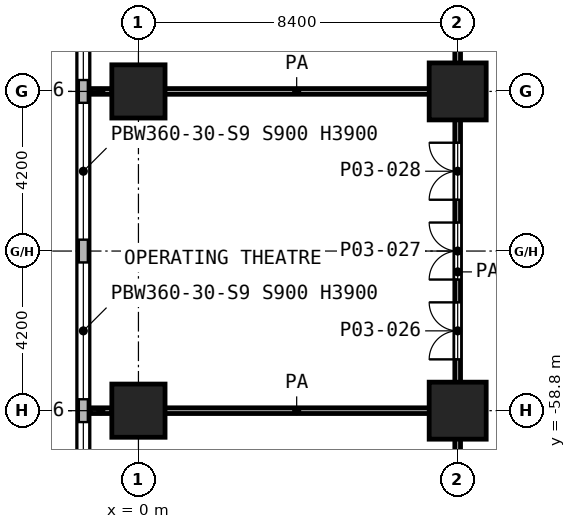
"""IFC4 building model, lengths in metres.
Left out: names, types, materials, properties, quantities, classifications, styles, units other than length and angle.
Written with IfcOpenShell. Run it as: python <this file> out.ifc"""

import sys

from ifc_helpers import new_model, si_unit, direction, frame, frame_2d, origin, origin_2d, place, context, subcontext, project, spatial, rectangle, extrude, element, fill, save


model = new_model("IFC4")
c1 = context("Model", 3, precision=1e-05, world=origin(), true_north=direction((0.0, 1.0)))
c2 = subcontext(c1, "Body", "Model", "MODEL_VIEW")
j1 = project(units=[si_unit("LENGTHUNIT", "METRE"), si_unit("PLANEANGLEUNIT", "RADIAN")], contexts=[c1])
p1 = place(None, origin())
s1 = spatial("IfcSite", under=j1, at=p1, CompositionType="ELEMENT")
p2 = place(p1, origin())
s2 = spatial("IfcBuilding", under=s1, at=p2, CompositionType="ELEMENT")
p3 = place(p2, frame((0.0, 0.0, 12.6)))
s3 = spatial("IfcBuildingStorey", under=s2, at=p3, CompositionType="ELEMENT", Elevation=12.6)
p4 = place(p3, frame((0.0, -50.4, 0.0), z_axis=(0.0, 0.0, 1.0), x_axis=(1.0, 0.0, 0.0)))
e1 = element("IfcColumn", 1, at=p4, inside=s3, PredefinedType="COLUMN", context=c2, shape_type="SweptSolid", body=[
    extrude(rectangle(XDim=1.4, YDim=1.4, at=origin_2d()), origin(), (0.0, 0.0, 1.0), 5.6),
])
p5 = place(p3, frame((8.4, -50.4, 0.0), z_axis=(0.0, 0.0, 1.0), x_axis=(1.0, 0.0, 0.0)))
e2 = element("IfcColumn", 2, at=p5, inside=s3, PredefinedType="COLUMN", context=c2, shape_type="SweptSolid", body=[
    extrude(rectangle(XDim=1.5, YDim=1.5, at=origin_2d()), origin(), (0.0, 0.0, 1.0), 5.6),
])
p6 = place(p3, frame((0.0, -58.8, 0.0), z_axis=(0.0, 0.0, 1.0), x_axis=(1.0, 0.0, 0.0)))
e3 = element("IfcColumn", 3, at=p6, inside=s3, PredefinedType="COLUMN", context=c2, shape_type="SweptSolid", body=[
    extrude(rectangle(XDim=1.4, YDim=1.4, at=origin_2d()), origin(), (0.0, 0.0, 1.0), 5.6),
])
p7 = place(p3, frame((8.4, -58.8, 0.0), z_axis=(0.0, 0.0, 1.0), x_axis=(1.0, 0.0, 0.0)))
e4 = element("IfcColumn", 4, at=p7, inside=s3, PredefinedType="COLUMN", context=c2, shape_type="SweptSolid", body=[
    extrude(rectangle(XDim=1.5, YDim=1.5, at=origin_2d()), origin(), (0.0, 0.0, 1.0), 5.6),
])
p8 = place(p3, frame((-1.45, -4.462, 0.0), z_axis=(0.0, 0.0, 1.0), x_axis=(0.0, -1.0, 0.0)))
e5 = element("IfcWall", 5, at=p8, inside=s3, PredefinedType="SOLIDWALL", context=c2, shape_type="SweptSolid", body=[
    extrude(rectangle(XDim=75.076, YDim=0.3, at=frame_2d((37.538, 0.0))), origin(), (0.0, 0.0, 1.0), 5.25),
])
p9 = place(p8, frame((0.738, 0.0, 0.9)))
e6 = element("IfcOpeningElement", 6, at=p9, cuts=e5, PredefinedType="OPENING", context=c2, shape_type="SweptSolid", body=[
    extrude(rectangle(XDim=2.4, YDim=3.0, at=frame_2d((1.2, 1.5))), frame((0.0, 0.16, 0.0), z_axis=(0.0, -1.0, 0.0), x_axis=(1.0, 0.0, 0.0)), (0.0, 0.0, 1.0), 0.32),
])
p10 = place(p8, frame((4.238, 0.0, 0.9)))
e7 = element("IfcOpeningElement", 7, at=p10, cuts=e5, PredefinedType="OPENING", context=c2, shape_type="SweptSolid", body=[
    extrude(rectangle(XDim=3.6, YDim=3.0, at=frame_2d((1.8, 1.5))), frame((0.0, 0.16, 0.0), z_axis=(0.0, -1.0, 0.0), x_axis=(1.0, 0.0, 0.0)), (0.0, 0.0, 1.0), 0.32),
])
p11 = place(p8, frame((8.438, 0.0, 0.9)))
e8 = element("IfcOpeningElement", 8, at=p11, cuts=e5, PredefinedType="OPENING", context=c2, shape_type="SweptSolid", body=[
    extrude(rectangle(XDim=3.6, YDim=3.0, at=frame_2d((1.8, 1.5))), frame((0.0, 0.16, 0.0), z_axis=(0.0, -1.0, 0.0), x_axis=(1.0, 0.0, 0.0)), (0.0, 0.0, 1.0), 0.32),
])
p12 = place(p8, frame((12.638, 0.0, 0.9)))
e9 = element("IfcOpeningElement", 9, at=p12, cuts=e5, PredefinedType="OPENING", context=c2, shape_type="SweptSolid", body=[
    extrude(rectangle(XDim=3.6, YDim=3.0, at=frame_2d((1.8, 1.5))), frame((0.0, 0.16, 0.0), z_axis=(0.0, -1.0, 0.0), x_axis=(1.0, 0.0, 0.0)), (0.0, 0.0, 1.0), 0.32),
])
p13 = place(p8, frame((16.838, 0.0, 0.9)))
e10 = element("IfcOpeningElement", 10, at=p13, cuts=e5, PredefinedType="OPENING", context=c2, shape_type="SweptSolid", body=[
    extrude(rectangle(XDim=3.6, YDim=3.0, at=frame_2d((1.8, 1.5))), frame((0.0, 0.16, 0.0), z_axis=(0.0, -1.0, 0.0), x_axis=(1.0, 0.0, 0.0)), (0.0, 0.0, 1.0), 0.32),
])
p14 = place(p8, frame((21.403, 0.0, 0.9)))
e11 = element("IfcOpeningElement", 11, at=p14, cuts=e5, PredefinedType="OPENING", context=c2, shape_type="SweptSolid", body=[
    extrude(rectangle(XDim=2.4, YDim=3.0, at=frame_2d((1.2, 1.5))), frame((0.0, 0.16, 0.0), z_axis=(0.0, -1.0, 0.0), x_axis=(1.0, 0.0, 0.0)), (0.0, 0.0, 1.0), 0.32),
])
p15 = place(p8, frame((25.238, 0.0, 0.9)))
e12 = element("IfcOpeningElement", 12, at=p15, cuts=e5, PredefinedType="OPENING", context=c2, shape_type="SweptSolid", body=[
    extrude(rectangle(XDim=3.6, YDim=3.0, at=frame_2d((1.8, 1.5))), frame((0.0, 0.16, 0.0), z_axis=(0.0, -1.0, 0.0), x_axis=(1.0, 0.0, 0.0)), (0.0, 0.0, 1.0), 0.32),
])
p16 = place(p8, frame((30.423, 0.0, 0.9)))
e13 = element("IfcOpeningElement", 13, at=p16, cuts=e5, PredefinedType="OPENING", context=c2, shape_type="SweptSolid", body=[
    extrude(rectangle(XDim=2.4, YDim=3.0, at=frame_2d((1.2, 1.5))), frame((0.0, 0.16, 0.0), z_axis=(0.0, -1.0, 0.0), x_axis=(1.0, 0.0, 0.0)), (0.0, 0.0, 1.0), 0.32),
])
p17 = place(p8, frame((33.638, 0.0, 0.9)))
e14 = element("IfcOpeningElement", 14, at=p17, cuts=e5, PredefinedType="OPENING", context=c2, shape_type="SweptSolid", body=[
    extrude(rectangle(XDim=3.6, YDim=3.0, at=frame_2d((1.8, 1.5))), frame((0.0, 0.16, 0.0), z_axis=(0.0, -1.0, 0.0), x_axis=(1.0, 0.0, 0.0)), (0.0, 0.0, 1.0), 0.32),
])
p18 = place(p8, frame((37.838, 0.0, 0.9)))
e15 = element("IfcOpeningElement", 15, at=p18, cuts=e5, PredefinedType="OPENING", context=c2, shape_type="SweptSolid", body=[
    extrude(rectangle(XDim=3.6, YDim=3.0, at=frame_2d((1.8, 1.5))), frame((0.0, 0.16, 0.0), z_axis=(0.0, -1.0, 0.0), x_axis=(1.0, 0.0, 0.0)), (0.0, 0.0, 1.0), 0.32),
])
p19 = place(p8, frame((42.038, 0.0, 0.9)))
e16 = element("IfcOpeningElement", 16, at=p19, cuts=e5, PredefinedType="OPENING", context=c2, shape_type="SweptSolid", body=[
    extrude(rectangle(XDim=3.6, YDim=3.0, at=frame_2d((1.8, 1.5))), frame((0.0, 0.16, 0.0), z_axis=(0.0, -1.0, 0.0), x_axis=(1.0, 0.0, 0.0)), (0.0, 0.0, 1.0), 0.32),
])
p20 = place(p8, frame((46.238, 0.0, 0.9)))
e17 = element("IfcOpeningElement", 17, at=p20, cuts=e5, PredefinedType="OPENING", context=c2, shape_type="SweptSolid", body=[
    extrude(rectangle(XDim=3.6, YDim=3.0, at=frame_2d((1.8, 1.5))), frame((0.0, 0.16, 0.0), z_axis=(0.0, -1.0, 0.0), x_axis=(1.0, 0.0, 0.0)), (0.0, 0.0, 1.0), 0.32),
])
p21 = place(p8, frame((50.438, 0.0, 0.9)))
e18 = element("IfcOpeningElement", 18, at=p21, cuts=e5, PredefinedType="OPENING", context=c2, shape_type="SweptSolid", body=[
    extrude(rectangle(XDim=3.6, YDim=3.0, at=frame_2d((1.8, 1.5))), frame((0.0, 0.16, 0.0), z_axis=(0.0, -1.0, 0.0), x_axis=(1.0, 0.0, 0.0)), (0.0, 0.0, 1.0), 0.32),
])
p22 = place(p8, frame((54.638, 0.0, 0.9)))
e19 = element("IfcOpeningElement", 19, at=p22, cuts=e5, PredefinedType="OPENING", context=c2, shape_type="SweptSolid", body=[
    extrude(rectangle(XDim=3.6, YDim=3.0, at=frame_2d((1.8, 1.5))), frame((0.0, 0.16, 0.0), z_axis=(0.0, -1.0, 0.0), x_axis=(1.0, 0.0, 0.0)), (0.0, 0.0, 1.0), 0.32),
])
p23 = place(p8, frame((58.838, 0.0, 0.9)))
e20 = element("IfcOpeningElement", 20, at=p23, cuts=e5, PredefinedType="OPENING", context=c2, shape_type="SweptSolid", body=[
    extrude(rectangle(XDim=3.6, YDim=3.0, at=frame_2d((1.8, 1.5))), frame((0.0, 0.16, 0.0), z_axis=(0.0, -1.0, 0.0), x_axis=(1.0, 0.0, 0.0)), (0.0, 0.0, 1.0), 0.32),
])
p24 = place(p8, frame((63.038, 0.0, 0.9)))
e21 = element("IfcOpeningElement", 21, at=p24, cuts=e5, PredefinedType="OPENING", context=c2, shape_type="SweptSolid", body=[
    extrude(rectangle(XDim=3.6, YDim=3.0, at=frame_2d((1.8, 1.5))), frame((0.0, 0.16, 0.0), z_axis=(0.0, -1.0, 0.0), x_axis=(1.0, 0.0, 0.0)), (0.0, 0.0, 1.0), 0.32),
])
p25 = place(p8, frame((67.603, 0.0, 0.9)))
e22 = element("IfcOpeningElement", 22, at=p25, cuts=e5, PredefinedType="OPENING", context=c2, shape_type="SweptSolid", body=[
    extrude(rectangle(XDim=1.2, YDim=3.0, at=frame_2d((0.6, 1.5))), frame((0.0, 0.16, 0.0), z_axis=(0.0, -1.0, 0.0), x_axis=(1.0, 0.0, 0.0)), (0.0, 0.0, 1.0), 0.32),
])
p26 = place(p8, frame((71.938, 0.0, 0.9)))
e23 = element("IfcOpeningElement", 23, at=p26, cuts=e5, PredefinedType="OPENING", context=c2, shape_type="SweptSolid", body=[
    extrude(rectangle(XDim=2.4, YDim=3.0, at=frame_2d((1.2, 1.5))), frame((0.0, 0.16, 0.0), z_axis=(0.0, -1.0, 0.0), x_axis=(1.0, 0.0, 0.0)), (0.0, 0.0, 1.0), 0.32),
])
p27 = place(p3, frame((-1.28, -58.8, 0.0), z_axis=(0.0, 0.0, 1.0), x_axis=(1.0, 0.0, 0.0)))
e24 = element("IfcWall", 24, at=p27, inside=s3, PredefinedType="PARTITIONING", context=c2, shape_type="SweptSolid", body=[
    extrude(rectangle(XDim=0.58, YDim=0.15, at=frame_2d((0.29, 0.0))), origin(), (0.0, 0.0, 1.0), 4.35),
])
p28 = place(p3, frame((0.002, -58.8, 0.0), z_axis=(0.0, 0.0, 1.0), x_axis=(1.0, 0.0, 0.0)))
e25 = element("IfcWall", 25, at=p28, inside=s3, PredefinedType="PARTITIONING", context=c2, shape_type="SweptSolid", body=[
    extrude(rectangle(XDim=8.323, YDim=0.15, at=frame_2d((4.162, 0.0))), origin(), (0.0, 0.0, 1.0), 5.25),
])
p29 = place(p3, frame((-1.28, -50.4, 0.0), z_axis=(0.0, 0.0, 1.0), x_axis=(1.0, 0.0, 0.0)))
e26 = element("IfcWall", 26, at=p29, inside=s3, PredefinedType="PARTITIONING", context=c2, shape_type="SweptSolid", body=[
    extrude(rectangle(XDim=0.58, YDim=0.15, at=frame_2d((0.29, 0.0))), origin(), (0.0, 0.0, 1.0), 4.35),
])
p30 = place(p3, frame((0.002, -50.4, 0.0), z_axis=(0.0, 0.0, 1.0), x_axis=(1.0, 0.0, 0.0)))
e27 = element("IfcWall", 27, at=p30, inside=s3, PredefinedType="PARTITIONING", context=c2, shape_type="SweptSolid", body=[
    extrude(rectangle(XDim=8.323, YDim=0.15, at=frame_2d((4.162, 0.0))), origin(), (0.0, 0.0, 1.0), 5.25),
])
p31 = place(p3, frame((8.4, -67.947, 0.0), z_axis=(0.0, 0.0, 1.0), x_axis=(0.0, 1.0, 0.0)))
e28 = element("IfcWall", 28, at=p31, inside=s3, PredefinedType="PARTITIONING", context=c2, shape_type="SweptSolid", body=[
    extrude(rectangle(XDim=25.597, YDim=0.15, at=frame_2d((12.798, 0.0))), origin(), (0.0, 0.0, 1.0), 5.25),
])
p32 = place(p31, frame((18.809, 0.0, 0.0)))
e29 = element("IfcOpeningElement", 29, at=p32, cuts=e28, PredefinedType="OPENING", context=c2, shape_type="SweptSolid", body=[
    extrude(rectangle(XDim=1.5, YDim=2.1, at=frame_2d((0.75, 1.05))), frame((0.0, 0.085, 0.0), z_axis=(0.0, -1.0, 0.0), x_axis=(1.0, 0.0, 0.0)), (0.0, 0.0, 1.0), 0.17),
])
p33 = place(p31, frame((20.822, 0.0, 0.0)))
e30 = element("IfcOpeningElement", 30, at=p33, cuts=e28, PredefinedType="OPENING", context=c2, shape_type="SweptSolid", body=[
    extrude(rectangle(XDim=1.5, YDim=2.1, at=frame_2d((0.75, 1.05))), frame((0.0, 0.085, 0.0), z_axis=(0.0, -1.0, 0.0), x_axis=(1.0, 0.0, 0.0)), (0.0, 0.0, 1.0), 0.17),
])
p34 = place(p31, frame((22.835, 0.0, 0.0)))
e31 = element("IfcOpeningElement", 31, at=p34, cuts=e28, PredefinedType="OPENING", context=c2, shape_type="SweptSolid", body=[
    extrude(rectangle(XDim=1.5, YDim=2.1, at=frame_2d((0.75, 1.05))), frame((0.0, 0.085, 0.0), z_axis=(0.0, -1.0, 0.0), x_axis=(1.0, 0.0, 0.0)), (0.0, 0.0, 1.0), 0.17),
])
p35 = place(p31, frame((10.497, 0.0, 0.0)))
e32 = element("IfcOpeningElement", 32, at=p35, cuts=e28, PredefinedType="OPENING", context=c2, shape_type="SweptSolid", body=[
    extrude(rectangle(XDim=1.5, YDim=2.1, at=frame_2d((0.75, 1.05))), frame((0.0, 0.085, 0.0), z_axis=(0.0, -1.0, 0.0), x_axis=(1.0, 0.0, 0.0)), (0.0, 0.0, 1.0), 0.17),
])
p36 = place(p31, frame((12.597, 0.0, 0.0)))
e33 = element("IfcOpeningElement", 33, at=p36, cuts=e28, PredefinedType="OPENING", context=c2, shape_type="SweptSolid", body=[
    extrude(rectangle(XDim=1.5, YDim=2.1, at=frame_2d((0.75, 1.05))), frame((0.0, 0.085, 0.0), z_axis=(0.0, -1.0, 0.0), x_axis=(1.0, 0.0, 0.0)), (0.0, 0.0, 1.0), 0.17),
])
p37 = place(p31, frame((14.697, 0.0, 0.0)))
e34 = element("IfcOpeningElement", 34, at=p37, cuts=e28, PredefinedType="OPENING", context=c2, shape_type="SweptSolid", body=[
    extrude(rectangle(XDim=1.5, YDim=2.1, at=frame_2d((0.75, 1.05))), frame((0.0, 0.085, 0.0), z_axis=(0.0, -1.0, 0.0), x_axis=(1.0, 0.0, 0.0)), (0.0, 0.0, 1.0), 0.17),
])
p38 = place(p31, frame((1.537, 0.0, 0.0)))
e35 = element("IfcOpeningElement", 35, at=p38, cuts=e28, PredefinedType="OPENING", context=c2, shape_type="SweptSolid", body=[
    extrude(rectangle(XDim=1.5, YDim=2.1, at=frame_2d((0.75, 1.05))), frame((0.0, 0.085, 0.0), z_axis=(0.0, -1.0, 0.0), x_axis=(1.0, 0.0, 0.0)), (0.0, 0.0, 1.0), 0.17),
])
p39 = place(p31, frame((3.823, 0.0, 0.0)))
e36 = element("IfcOpeningElement", 36, at=p39, cuts=e28, PredefinedType="OPENING", context=c2, shape_type="SweptSolid", body=[
    extrude(rectangle(XDim=1.5, YDim=2.1, at=frame_2d((0.75, 1.05))), frame((0.0, 0.085, 0.0), z_axis=(0.0, -1.0, 0.0), x_axis=(1.0, 0.0, 0.0)), (0.0, 0.0, 1.0), 0.17),
])
p40 = place(p31, frame((6.11, 0.0, 0.0)))
e37 = element("IfcOpeningElement", 37, at=p40, cuts=e28, PredefinedType="OPENING", context=c2, shape_type="SweptSolid", body=[
    extrude(rectangle(XDim=1.5, YDim=2.1, at=frame_2d((0.75, 1.05))), frame((0.0, 0.085, 0.0), z_axis=(0.0, -1.0, 0.0), x_axis=(1.0, 0.0, 0.0)), (0.0, 0.0, 1.0), 0.17),
])
p41 = place(p19, origin())
e38 = element("IfcWindow", 38, at=p41, inside=s3, PartitioningType="SINGLE_PANEL", PredefinedType="WINDOW", context=c2, shape_type="SweptSolid", body=[
    extrude(rectangle(XDim=3.6, YDim=3.0, at=frame_2d((1.8, 1.5))), frame((0.0, 0.03, 0.0), z_axis=(0.0, -1.0, 0.0), x_axis=(1.0, 0.0, 0.0)), (0.0, 0.0, 1.0), 0.06),
])
fill(e16, e38)
p42 = place(p20, origin())
e39 = element("IfcWindow", 39, at=p42, inside=s3, PartitioningType="SINGLE_PANEL", PredefinedType="WINDOW", context=c2, shape_type="SweptSolid", body=[
    extrude(rectangle(XDim=3.6, YDim=3.0, at=frame_2d((1.8, 1.5))), frame((0.0, 0.03, 0.0), z_axis=(0.0, -1.0, 0.0), x_axis=(1.0, 0.0, 0.0)), (0.0, 0.0, 1.0), 0.06),
])
fill(e17, e39)
p43 = place(p21, origin())
e40 = element("IfcWindow", 40, at=p43, inside=s3, PartitioningType="SINGLE_PANEL", PredefinedType="WINDOW", context=c2, shape_type="SweptSolid", body=[
    extrude(rectangle(XDim=3.6, YDim=3.0, at=frame_2d((1.8, 1.5))), frame((0.0, 0.03, 0.0), z_axis=(0.0, -1.0, 0.0), x_axis=(1.0, 0.0, 0.0)), (0.0, 0.0, 1.0), 0.06),
])
fill(e18, e40)
p44 = place(p22, origin())
e41 = element("IfcWindow", 41, at=p44, inside=s3, PartitioningType="SINGLE_PANEL", PredefinedType="WINDOW", context=c2, shape_type="SweptSolid", body=[
    extrude(rectangle(XDim=3.6, YDim=3.0, at=frame_2d((1.8, 1.5))), frame((0.0, 0.03, 0.0), z_axis=(0.0, -1.0, 0.0), x_axis=(1.0, 0.0, 0.0)), (0.0, 0.0, 1.0), 0.06),
])
fill(e19, e41)
p45 = place(p35, origin())
e42 = element("IfcDoor", 42, at=p45, inside=s3, OperationType="DOUBLE_DOOR_SINGLE_SWING", PredefinedType="DOOR", context=c2, shape_type="SweptSolid", body=[
    extrude(rectangle(XDim=1.5, YDim=2.1, at=frame_2d((0.75, 1.05))), frame((0.0, 0.025, 0.0), z_axis=(0.0, -1.0, 0.0), x_axis=(1.0, 0.0, 0.0)), (0.0, 0.0, 1.0), 0.05),
])
fill(e32, e42)
p46 = place(p36, origin())
e43 = element("IfcDoor", 43, at=p46, inside=s3, OperationType="DOUBLE_DOOR_SINGLE_SWING", PredefinedType="DOOR", context=c2, shape_type="SweptSolid", body=[
    extrude(rectangle(XDim=1.5, YDim=2.1, at=frame_2d((0.75, 1.05))), frame((0.0, 0.025, 0.0), z_axis=(0.0, -1.0, 0.0), x_axis=(1.0, 0.0, 0.0)), (0.0, 0.0, 1.0), 0.05),
])
fill(e33, e43)
p47 = place(p37, origin())
e44 = element("IfcDoor", 44, at=p47, inside=s3, OperationType="DOUBLE_DOOR_SINGLE_SWING", PredefinedType="DOOR", context=c2, shape_type="SweptSolid", body=[
    extrude(rectangle(XDim=1.5, YDim=2.1, at=frame_2d((0.75, 1.05))), frame((0.0, 0.025, 0.0), z_axis=(0.0, -1.0, 0.0), x_axis=(1.0, 0.0, 0.0)), (0.0, 0.0, 1.0), 0.05),
])
fill(e34, e44)
save(model, sys.argv[1])
